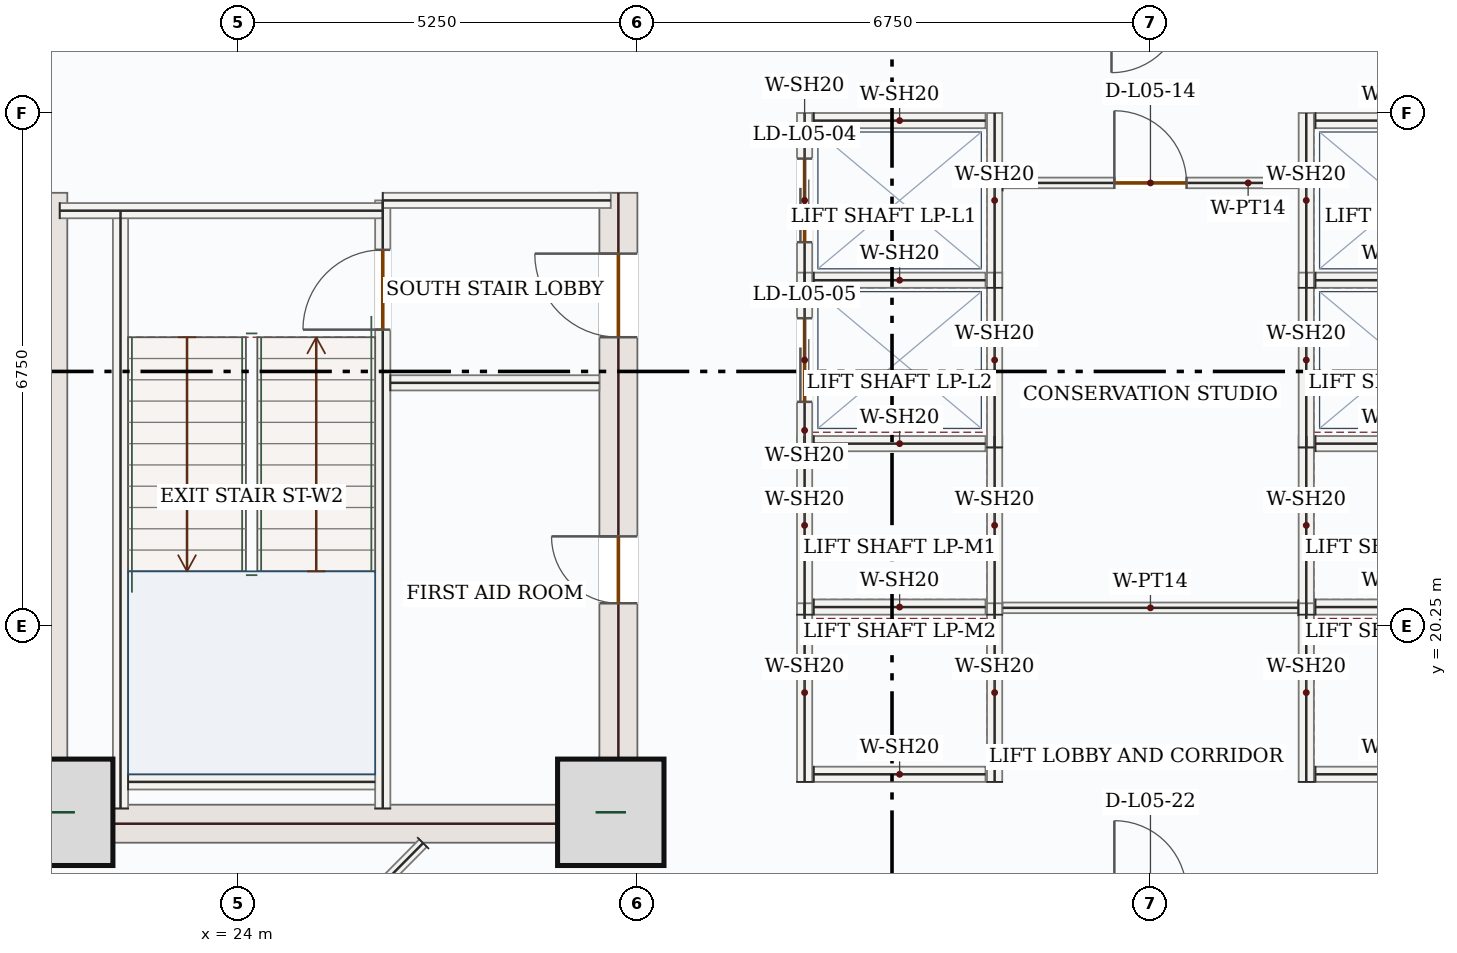
"""IFC4 building model, lengths in metres.
Left out: names, types, materials, properties, quantities, classifications, styles, units other than length and angle.
Written with IfcOpenShell. Run it as: python <this file> out.ifc"""

import sys

from ifc_helpers import new_model, si_unit, direction, frame, frame_2d, origin, origin_2d, place, context, subcontext, project, spatial, rectangle, extrude, source, transform, mapped, element, fill, save


model = new_model("IFC4")
c1 = context("Model", 3, precision=1e-05, world=origin(), true_north=direction((0.0, 1.0)))
c2 = subcontext(c1, "Body", "Model", "MODEL_VIEW")
j1 = project(units=[si_unit("LENGTHUNIT", "METRE"), si_unit("PLANEANGLEUNIT", "RADIAN")], contexts=[c1])
p1 = place(None, origin())
s1 = spatial("IfcSite", under=j1, at=p1, CompositionType="ELEMENT")
p2 = place(p1, origin())
s2 = spatial("IfcBuilding", under=s1, at=p2, CompositionType="ELEMENT")
p3 = place(p2, frame((0.0, 0.0, 29.1)))
s3 = spatial("IfcBuildingStorey", under=s2, at=p3, CompositionType="ELEMENT", Elevation=29.1)
m1 = source(origin(), c2, "Body", "SweptSolid", [
    extrude(rectangle(XDim=8.55, YDim=0.5, at=frame_2d((4.275, 0.0))), origin(), (0.0, 0.0, 1.0), 3.95),
])
p4 = place(p3, frame((21.5, 17.4, 0.0), z_axis=(0.0, 0.0, 1.0), x_axis=(0.0, 1.0, 0.0)))
e1 = element("IfcWall", 1, at=p4, inside=s3, PredefinedType="SHEAR", context=c2, shape_type="MappedRepresentation", body=[
    mapped(m1, transform((0.0, 0.0, 0.0), x_axis=(1.0, 0.0, 0.0), y_axis=(0.0, 1.0, 0.0), z_axis=(0.0, 0.0, 1.0), scale=1.0)),
])
p5 = place(p3, frame((29.0, 17.4, 0.0), z_axis=(0.0, 0.0, 1.0), x_axis=(0.0, 1.0, 0.0)))
e2 = element("IfcWall", 2, at=p5, inside=s3, PredefinedType="SHEAR", context=c2, shape_type="SweptSolid", body=[
    extrude(rectangle(XDim=8.55, YDim=0.5, at=frame_2d((4.275, 0.0))), origin(), (0.0, 0.0, 1.0), 3.95),
])
p6 = place(p5, frame((6.65, 0.0, 0.0)))
e3 = element("IfcOpeningElement", 3, at=p6, cuts=e2, PredefinedType="OPENING", context=c2, shape_type="SweptSolid", body=[
    extrude(rectangle(XDim=1.1, YDim=2.2, at=frame_2d((0.55, 1.1))), frame((0.0, 0.26, 0.0), z_axis=(0.0, -1.0, 0.0), x_axis=(1.0, 0.0, 0.0)), (0.0, 0.0, 1.0), 0.52),
])
p7 = place(p5, frame((3.15, 0.0, 0.0)))
e4 = element("IfcOpeningElement", 4, at=p7, cuts=e2, PredefinedType="OPENING", context=c2, shape_type="SweptSolid", body=[
    extrude(rectangle(XDim=0.88, YDim=2.1, at=frame_2d((0.44, 1.05))), frame((0.0, 0.26, 0.0), z_axis=(0.0, -1.0, 0.0), x_axis=(1.0, 0.0, 0.0)), (0.0, 0.0, 1.0), 0.52),
])
m2 = source(origin(), c2, "Body", "SweptSolid", [
    extrude(rectangle(XDim=7.0, YDim=0.5, at=frame_2d((3.5, 0.0))), origin(), (0.0, 0.0, 1.0), 3.95),
])
p8 = place(p3, frame((21.75, 17.65, 0.0), z_axis=(0.0, 0.0, 1.0), x_axis=(1.0, 0.0, 0.0)))
e5 = element("IfcWall", 5, at=p8, inside=s3, PredefinedType="SHEAR", context=c2, shape_type="MappedRepresentation", body=[
    mapped(m2, transform((0.0, 0.0, 0.0), x_axis=(1.0, 0.0, 0.0), y_axis=(0.0, 1.0, 0.0), z_axis=(0.0, 0.0, 1.0), scale=1.0)),
])
m3 = source(origin(), c2, "Body", "SweptSolid", [
    extrude(rectangle(XDim=1.4, YDim=1.4, at=origin_2d()), origin(), (0.0, 0.0, 1.0), 4.2),
])
for number, where, z_axis, x_axis in (
    (6, (21.65, 17.8, 0.0), (0.0, 0.0, 1.0), (1.0, 0.0, 0.0)),
    (7, (28.9, 17.8, 0.0), (0.0, 0.0, 1.0), (1.0, 0.0, 0.0)),
):
    element("IfcColumn", number, at=place(p3, frame(where, z_axis=z_axis, x_axis=x_axis)), inside=s3, PredefinedType="COLUMN", context=c2, shape_type="MappedRepresentation", body=[
        mapped(m3, transform((0.0, 0.0, 0.0), x_axis=(1.0, 0.0, 0.0), y_axis=(0.0, 1.0, 0.0), z_axis=(0.0, 0.0, 1.0), scale=1.0)),
    ])
p9 = place(p3, frame((22.658, 14.74, 0.0), z_axis=(0.0, 0.0, 1.0), x_axis=(-0.707106781187, 0.707106781187, 0.0)))
e8 = element("IfcWall", 8, at=p9, inside=s3, PredefinedType="SOLIDWALL", context=c2, shape_type="SweptSolid", body=[
    extrude(rectangle(XDim=5.258, YDim=0.32, at=frame_2d((2.629, 0.0))), origin(), (0.0, 0.0, 1.0), 3.95),
])
p10 = place(p9, frame((1.429, 0.0, 0.85)))
e9 = element("IfcOpeningElement", 9, at=p10, cuts=e8, PredefinedType="OPENING", context=c2, shape_type="SweptSolid", body=[
    extrude(rectangle(XDim=2.4, YDim=1.8, at=frame_2d((1.2, 0.9))), frame((0.0, 0.17, 0.0), z_axis=(0.0, -1.0, 0.0), x_axis=(1.0, 0.0, 0.0)), (0.0, 0.0, 1.0), 0.34),
])
m4 = source(origin(), c2, "Body", "SweptSolid", [
    extrude(rectangle(XDim=7.87, YDim=0.2, at=frame_2d((3.935, 0.0))), origin(), (0.0, 0.0, 1.0), 3.95),
])
p11 = place(p3, frame((22.45, 17.85, 0.0), z_axis=(0.0, 0.0, 1.0), x_axis=(0.0, 1.0, 0.0)))
e10 = element("IfcWall", 10, at=p11, inside=s3, PredefinedType="SOLIDWALL", context=c2, shape_type="MappedRepresentation", body=[
    mapped(m4, transform((0.0, 0.0, 0.0), x_axis=(1.0, 0.0, 0.0), y_axis=(0.0, 1.0, 0.0), z_axis=(0.0, 0.0, 1.0), scale=1.0)),
])
p12 = place(p3, frame((25.9, 17.85, 0.0), z_axis=(0.0, 0.0, 1.0), x_axis=(0.0, 1.0, 0.0)))
e11 = element("IfcWall", 11, at=p12, inside=s3, PredefinedType="SOLIDWALL", context=c2, shape_type="SweptSolid", body=[
    extrude(rectangle(XDim=8.0, YDim=0.2, at=frame_2d((4.0, 0.0))), origin(), (0.0, 0.0, 1.0), 3.95),
])
p13 = place(p12, frame((6.3, 0.0, 0.0)))
e12 = element("IfcOpeningElement", 12, at=p13, cuts=e11, PredefinedType="OPENING", context=c2, shape_type="SweptSolid", body=[
    extrude(rectangle(XDim=1.05, YDim=2.15, at=frame_2d((0.525, 1.075))), frame((0.0, 0.11, 0.0), z_axis=(0.0, -1.0, 0.0), x_axis=(1.0, 0.0, 0.0)), (0.0, 0.0, 1.0), 0.22),
])
m5 = source(origin(), c2, "Body", "SweptSolid", [
    extrude(rectangle(XDim=4.25, YDim=0.2, at=frame_2d((2.125, 0.0))), origin(), (0.0, 0.0, 1.0), 3.95),
])
p14 = place(p3, frame((21.65, 25.715, 0.0), z_axis=(0.0, 0.0, 1.0), x_axis=(1.0, 0.0, 0.0)))
e13 = element("IfcWall", 13, at=p14, inside=s3, PredefinedType="SOLIDWALL", context=c2, shape_type="MappedRepresentation", body=[
    mapped(m5, transform((0.0, 0.0, 0.0), x_axis=(1.0, 0.0, 0.0), y_axis=(0.0, 1.0, 0.0), z_axis=(0.0, 0.0, 1.0), scale=1.0)),
])
m6 = source(origin(), c2, "Body", "SweptSolid", [
    extrude(rectangle(XDim=3.0, YDim=0.2, at=frame_2d((1.5, 0.0))), origin(), (0.0, 0.0, 1.0), 3.95),
])
p15 = place(p3, frame((25.9, 25.85, 0.0), z_axis=(0.0, 0.0, 1.0), x_axis=(1.0, 0.0, 0.0)))
e14 = element("IfcWall", 14, at=p15, inside=s3, PredefinedType="SOLIDWALL", context=c2, shape_type="MappedRepresentation", body=[
    mapped(m6, transform((0.0, 0.0, 0.0), x_axis=(1.0, 0.0, 0.0), y_axis=(0.0, 1.0, 0.0), z_axis=(0.0, 0.0, 1.0), scale=1.0)),
])
m7 = source(origin(), c2, "Body", "SweptSolid", [
    extrude(rectangle(XDim=3.25, YDim=0.2, at=frame_2d((1.625, 0.0))), origin(), (0.0, 0.0, 1.0), 3.95),
])
p16 = place(p3, frame((22.55, 18.2, 0.0), z_axis=(0.0, 0.0, 1.0), x_axis=(1.0, 0.0, 0.0)))
e15 = element("IfcWall", 15, at=p16, inside=s3, PredefinedType="SOLIDWALL", context=c2, shape_type="MappedRepresentation", body=[
    mapped(m7, transform((0.0, 0.0, 0.0), x_axis=(1.0, 0.0, 0.0), y_axis=(0.0, 1.0, 0.0), z_axis=(0.0, 0.0, 1.0), scale=1.0)),
])
m8 = source(origin(), c2, "Body", "SweptSolid", [
    extrude(rectangle(XDim=2.75, YDim=0.2, at=frame_2d((1.375, 0.0))), origin(), (0.0, 0.0, 1.0), 3.95),
])
p17 = place(p3, frame((26.0, 23.45, 0.0), z_axis=(0.0, 0.0, 1.0), x_axis=(1.0, 0.0, 0.0)))
e16 = element("IfcWall", 16, at=p17, inside=s3, PredefinedType="SOLIDWALL", context=c2, shape_type="MappedRepresentation", body=[
    mapped(m8, transform((0.0, 0.0, 0.0), x_axis=(1.0, 0.0, 0.0), y_axis=(0.0, 1.0, 0.0), z_axis=(0.0, 0.0, 1.0), scale=1.0)),
])
m9 = source(origin(), c2, "Body", "SweptSolid", [
    extrude(rectangle(XDim=2.35, YDim=0.2, at=frame_2d((1.175, 0.0))), origin(), (0.0, 0.0, 1.0), 3.95),
])
for number, where, z_axis, x_axis in (
    (17, (31.45, 20.4, 0.0), (0.0, 0.0, 1.0), (0.0, 1.0, 0.0)),
    (18, (33.95, 20.4, 0.0), (0.0, 0.0, 1.0), (0.0, 1.0, 0.0)),
):
    element("IfcWall", number, at=place(p3, frame(where, z_axis=z_axis, x_axis=x_axis)), inside=s3, PredefinedType="SOLIDWALL", context=c2, shape_type="MappedRepresentation", body=[
        mapped(m9, transform((0.0, 0.0, 0.0), x_axis=(1.0, 0.0, 0.0), y_axis=(0.0, 1.0, 0.0), z_axis=(0.0, 0.0, 1.0), scale=1.0)),
    ])
m10 = source(origin(), c2, "Body", "SweptSolid", [
    extrude(rectangle(XDim=2.26, YDim=0.2, at=frame_2d((1.13, 0.0))), origin(), (0.0, 0.0, 1.0), 3.95),
])
for number, where, z_axis, x_axis in (
    (19, (31.57, 20.5, 0.0), (0.0, 0.0, 1.0), (1.0, 0.0, 0.0)),
    (20, (31.57, 22.65, 0.0), (0.0, 0.0, 1.0), (1.0, 0.0, 0.0)),
):
    element("IfcWall", number, at=place(p3, frame(where, z_axis=z_axis, x_axis=x_axis)), inside=s3, PredefinedType="SOLIDWALL", context=c2, shape_type="MappedRepresentation", body=[
        mapped(m10, transform((0.0, 0.0, 0.0), x_axis=(1.0, 0.0, 0.0), y_axis=(0.0, 1.0, 0.0), z_axis=(0.0, 0.0, 1.0), scale=1.0)),
    ])
for number, where, z_axis, x_axis in (
    (21, (31.45, 18.2, 0.0), (0.0, 0.0, 1.0), (0.0, 1.0, 0.0)),
    (22, (33.95, 18.2, 0.0), (0.0, 0.0, 1.0), (0.0, 1.0, 0.0)),
):
    element("IfcWall", number, at=place(p3, frame(where, z_axis=z_axis, x_axis=x_axis)), inside=s3, PredefinedType="SOLIDWALL", context=c2, shape_type="MappedRepresentation", body=[
        mapped(m9, transform((0.0, 0.0, 0.0), x_axis=(1.0, 0.0, 0.0), y_axis=(0.0, 1.0, 0.0), z_axis=(0.0, 0.0, 1.0), scale=1.0)),
    ])
p18 = place(p3, frame((31.57, 18.3, 0.0), z_axis=(0.0, 0.0, 1.0), x_axis=(1.0, 0.0, 0.0)))
e23 = element("IfcWall", 23, at=p18, inside=s3, PredefinedType="SOLIDWALL", context=c2, shape_type="MappedRepresentation", body=[
    mapped(m10, transform((0.0, 0.0, 0.0), x_axis=(1.0, 0.0, 0.0), y_axis=(0.0, 1.0, 0.0), z_axis=(0.0, 0.0, 1.0), scale=1.0)),
])
p19 = place(p3, frame((38.05, 20.4, 0.0), z_axis=(0.0, 0.0, 1.0), x_axis=(0.0, 1.0, 0.0)))
e24 = element("IfcWall", 24, at=p19, inside=s3, PredefinedType="SOLIDWALL", context=c2, shape_type="MappedRepresentation", body=[
    mapped(m9, transform((0.0, 0.0, 0.0), x_axis=(1.0, 0.0, 0.0), y_axis=(0.0, 1.0, 0.0), z_axis=(0.0, 0.0, 1.0), scale=1.0)),
])
for number, where, z_axis, x_axis in (
    (25, (38.17, 20.5, 0.0), (0.0, 0.0, 1.0), (1.0, 0.0, 0.0)),
    (26, (38.17, 22.65, 0.0), (0.0, 0.0, 1.0), (1.0, 0.0, 0.0)),
):
    element("IfcWall", number, at=place(p3, frame(where, z_axis=z_axis, x_axis=x_axis)), inside=s3, PredefinedType="SOLIDWALL", context=c2, shape_type="MappedRepresentation", body=[
        mapped(m10, transform((0.0, 0.0, 0.0), x_axis=(1.0, 0.0, 0.0), y_axis=(0.0, 1.0, 0.0), z_axis=(0.0, 0.0, 1.0), scale=1.0)),
    ])
p20 = place(p3, frame((38.05, 18.2, 0.0), z_axis=(0.0, 0.0, 1.0), x_axis=(0.0, 1.0, 0.0)))
e27 = element("IfcWall", 27, at=p20, inside=s3, PredefinedType="SOLIDWALL", context=c2, shape_type="MappedRepresentation", body=[
    mapped(m9, transform((0.0, 0.0, 0.0), x_axis=(1.0, 0.0, 0.0), y_axis=(0.0, 1.0, 0.0), z_axis=(0.0, 0.0, 1.0), scale=1.0)),
])
p21 = place(p3, frame((38.17, 18.3, 0.0), z_axis=(0.0, 0.0, 1.0), x_axis=(1.0, 0.0, 0.0)))
e28 = element("IfcWall", 28, at=p21, inside=s3, PredefinedType="SOLIDWALL", context=c2, shape_type="MappedRepresentation", body=[
    mapped(m10, transform((0.0, 0.0, 0.0), x_axis=(1.0, 0.0, 0.0), y_axis=(0.0, 1.0, 0.0), z_axis=(0.0, 0.0, 1.0), scale=1.0)),
])
p22 = place(p3, frame((31.45, 24.7, 0.0), z_axis=(0.0, 0.0, 1.0), x_axis=(0.0, 1.0, 0.0)))
e29 = element("IfcWall", 29, at=p22, inside=s3, PredefinedType="SOLIDWALL", context=c2, shape_type="SweptSolid", body=[
    extrude(rectangle(XDim=2.3, YDim=0.2, at=frame_2d((1.15, 0.0))), origin(), (0.0, 0.0, 1.0), 3.95),
])
p23 = place(p22, frame((0.6, 0.0, 0.0)))
e30 = element("IfcOpeningElement", 30, at=p23, cuts=e29, PredefinedType="OPENING", context=c2, shape_type="SweptSolid", body=[
    extrude(rectangle(XDim=1.1, YDim=2.15, at=frame_2d((0.55, 1.075))), frame((0.0, 0.11, 0.0), z_axis=(0.0, -1.0, 0.0), x_axis=(1.0, 0.0, 0.0)), (0.0, 0.0, 1.0), 0.22),
])
m11 = source(origin(), c2, "Body", "SweptSolid", [
    extrude(rectangle(XDim=2.3, YDim=0.2, at=frame_2d((1.15, 0.0))), origin(), (0.0, 0.0, 1.0), 3.95),
])
p24 = place(p3, frame((33.95, 24.7, 0.0), z_axis=(0.0, 0.0, 1.0), x_axis=(0.0, 1.0, 0.0)))
e31 = element("IfcWall", 31, at=p24, inside=s3, PredefinedType="SOLIDWALL", context=c2, shape_type="MappedRepresentation", body=[
    mapped(m11, transform((0.0, 0.0, 0.0), x_axis=(1.0, 0.0, 0.0), y_axis=(0.0, 1.0, 0.0), z_axis=(0.0, 0.0, 1.0), scale=1.0)),
])
for number, where, z_axis, x_axis in (
    (32, (31.57, 24.8, 0.0), (0.0, 0.0, 1.0), (1.0, 0.0, 0.0)),
    (33, (31.57, 26.9, 0.0), (0.0, 0.0, 1.0), (1.0, 0.0, 0.0)),
):
    element("IfcWall", number, at=place(p3, frame(where, z_axis=z_axis, x_axis=x_axis)), inside=s3, PredefinedType="SOLIDWALL", context=c2, shape_type="MappedRepresentation", body=[
        mapped(m10, transform((0.0, 0.0, 0.0), x_axis=(1.0, 0.0, 0.0), y_axis=(0.0, 1.0, 0.0), z_axis=(0.0, 0.0, 1.0), scale=1.0)),
    ])
p25 = place(p3, frame((31.45, 22.6, 0.0), z_axis=(0.0, 0.0, 1.0), x_axis=(0.0, 1.0, 0.0)))
e34 = element("IfcWall", 34, at=p25, inside=s3, PredefinedType="SOLIDWALL", context=c2, shape_type="SweptSolid", body=[
    extrude(rectangle(XDim=2.3, YDim=0.2, at=frame_2d((1.15, 0.0))), origin(), (0.0, 0.0, 1.0), 3.95),
])
p26 = place(p25, frame((0.6, 0.0, 0.0)))
e35 = element("IfcOpeningElement", 35, at=p26, cuts=e34, PredefinedType="OPENING", context=c2, shape_type="SweptSolid", body=[
    extrude(rectangle(XDim=1.1, YDim=2.15, at=frame_2d((0.55, 1.075))), frame((0.0, 0.11, 0.0), z_axis=(0.0, -1.0, 0.0), x_axis=(1.0, 0.0, 0.0)), (0.0, 0.0, 1.0), 0.22),
])
m12 = source(origin(), c2, "Body", "SweptSolid", [
    extrude(rectangle(XDim=2.3, YDim=0.2, at=frame_2d((1.15, 0.0))), origin(), (0.0, 0.0, 1.0), 3.95),
])
p27 = place(p3, frame((33.95, 22.6, 0.0), z_axis=(0.0, 0.0, 1.0), x_axis=(0.0, 1.0, 0.0)))
e36 = element("IfcWall", 36, at=p27, inside=s3, PredefinedType="SOLIDWALL", context=c2, shape_type="MappedRepresentation", body=[
    mapped(m12, transform((0.0, 0.0, 0.0), x_axis=(1.0, 0.0, 0.0), y_axis=(0.0, 1.0, 0.0), z_axis=(0.0, 0.0, 1.0), scale=1.0)),
])
p28 = place(p3, frame((38.05, 24.7, 0.0), z_axis=(0.0, 0.0, 1.0), x_axis=(0.0, 1.0, 0.0)))
e37 = element("IfcWall", 37, at=p28, inside=s3, PredefinedType="SOLIDWALL", context=c2, shape_type="MappedRepresentation", body=[
    mapped(m11, transform((0.0, 0.0, 0.0), x_axis=(1.0, 0.0, 0.0), y_axis=(0.0, 1.0, 0.0), z_axis=(0.0, 0.0, 1.0), scale=1.0)),
])
for number, where, z_axis, x_axis in (
    (38, (38.17, 24.8, 0.0), (0.0, 0.0, 1.0), (1.0, 0.0, 0.0)),
    (39, (38.17, 26.9, 0.0), (0.0, 0.0, 1.0), (1.0, 0.0, 0.0)),
):
    element("IfcWall", number, at=place(p3, frame(where, z_axis=z_axis, x_axis=x_axis)), inside=s3, PredefinedType="SOLIDWALL", context=c2, shape_type="MappedRepresentation", body=[
        mapped(m10, transform((0.0, 0.0, 0.0), x_axis=(1.0, 0.0, 0.0), y_axis=(0.0, 1.0, 0.0), z_axis=(0.0, 0.0, 1.0), scale=1.0)),
    ])
p29 = place(p3, frame((38.05, 22.6, 0.0), z_axis=(0.0, 0.0, 1.0), x_axis=(0.0, 1.0, 0.0)))
e40 = element("IfcWall", 40, at=p29, inside=s3, PredefinedType="SOLIDWALL", context=c2, shape_type="MappedRepresentation", body=[
    mapped(m12, transform((0.0, 0.0, 0.0), x_axis=(1.0, 0.0, 0.0), y_axis=(0.0, 1.0, 0.0), z_axis=(0.0, 0.0, 1.0), scale=1.0)),
])
p30 = place(p3, frame((34.055, 26.08, 0.0), z_axis=(0.0, 0.0, 1.0), x_axis=(1.0, 0.0, 0.0)))
e41 = element("IfcWall", 41, at=p30, inside=s3, PredefinedType="PARTITIONING", context=c2, shape_type="SweptSolid", body=[
    extrude(rectangle(XDim=3.89, YDim=0.14, at=frame_2d((1.945, 0.0))), origin(), (0.0, 0.0, 1.0), 3.95),
])
p31 = place(p30, frame((1.47, 0.0, 0.0)))
e42 = element("IfcOpeningElement", 42, at=p31, cuts=e41, PredefinedType="OPENING", context=c2, shape_type="SweptSolid", body=[
    extrude(rectangle(XDim=0.95, YDim=2.15, at=frame_2d((0.475, 1.075))), frame((0.0, 0.08, 0.0), z_axis=(0.0, -1.0, 0.0), x_axis=(1.0, 0.0, 0.0)), (0.0, 0.0, 1.0), 0.16),
])
m13 = source(origin(), c2, "Body", "SweptSolid", [
    extrude(rectangle(XDim=3.89, YDim=0.14, at=frame_2d((1.945, 0.0))), origin(), (0.0, 0.0, 1.0), 3.95),
])
p32 = place(p3, frame((37.945, 20.49, 0.0), z_axis=(0.0, 0.0, 1.0), x_axis=(-1.0, 0.0, 0.0)))
e43 = element("IfcWall", 43, at=p32, inside=s3, PredefinedType="PARTITIONING", context=c2, shape_type="MappedRepresentation", body=[
    mapped(m13, transform((0.0, 0.0, 0.0), x_axis=(1.0, 0.0, 0.0), y_axis=(0.0, 1.0, 0.0), z_axis=(0.0, 0.0, 1.0), scale=1.0)),
])
m14 = source(origin(), c2, "Body", "SweptSolid", [
    extrude(rectangle(XDim=3.505, YDim=0.14, at=frame_2d((1.752, 0.0))), origin(), (0.0, 0.0, 1.0), 3.95),
])
p33 = place(p3, frame((26.431, 17.395, 0.0), z_axis=(0.0, 0.0, 1.0), x_axis=(-0.703790445361, -0.710407635811, 0.0)))
e44 = element("IfcWall", 44, at=p33, inside=s3, PredefinedType="PARTITIONING", context=c2, shape_type="MappedRepresentation", body=[
    mapped(m14, transform((0.0, 0.0, 0.0), x_axis=(1.0, 0.0, 0.0), y_axis=(0.0, 1.0, 0.0), z_axis=(0.0, 0.0, 1.0), scale=1.0)),
])
m15 = source(origin(), c2, "Body", "SweptSolid", [
    extrude(rectangle(XDim=2.4, YDim=1.8, at=frame_2d((1.2, 0.9))), frame((0.0, 0.03, 0.0), z_axis=(0.0, -1.0, 0.0), x_axis=(1.0, 0.0, 0.0)), (0.0, 0.0, 1.0), 0.06),
])
p34 = place(p10, origin())
e45 = element("IfcWindow", 45, at=p34, inside=s3, PartitioningType="DOUBLE_PANEL_VERTICAL", PredefinedType="WINDOW", context=c2, shape_type="MappedRepresentation", body=[
    mapped(m15, transform((0.0, 0.0, 0.0), x_axis=(1.0, 0.0, 0.0), y_axis=(0.0, 1.0, 0.0), z_axis=(0.0, 0.0, 1.0), scale=1.0)),
])
fill(e9, e45)
m16 = source(origin(), c2, "Body", "SweptSolid", [
    extrude(rectangle(XDim=1.05, YDim=2.15, at=frame_2d((0.525, 1.075))), frame((0.0, 0.025, 0.0), z_axis=(0.0, -1.0, 0.0), x_axis=(1.0, 0.0, 0.0)), (0.0, 0.0, 1.0), 0.05),
])
p35 = place(p13, origin())
e46 = element("IfcDoor", 46, at=p35, inside=s3, OperationType="SINGLE_SWING_LEFT", PredefinedType="DOOR", context=c2, shape_type="MappedRepresentation", body=[
    mapped(m16, transform((0.0, 0.0, 0.0), x_axis=(1.0, 0.0, 0.0), y_axis=(0.0, 1.0, 0.0), z_axis=(0.0, 0.0, 1.0), scale=1.0)),
])
fill(e12, e46)
m17 = source(origin(), c2, "Body", "SweptSolid", [
    extrude(rectangle(XDim=1.1, YDim=2.2, at=frame_2d((0.55, 1.1))), frame((0.0, 0.025, 0.0), z_axis=(0.0, -1.0, 0.0), x_axis=(1.0, 0.0, 0.0)), (0.0, 0.0, 1.0), 0.05),
])
p36 = place(p6, origin())
e47 = element("IfcDoor", 47, at=p36, inside=s3, OperationType="SINGLE_SWING_RIGHT", PredefinedType="DOOR", context=c2, shape_type="MappedRepresentation", body=[
    mapped(m17, transform((0.0, 0.0, 0.0), x_axis=(1.0, 0.0, 0.0), y_axis=(0.0, 1.0, 0.0), z_axis=(0.0, 0.0, 1.0), scale=1.0)),
])
fill(e3, e47)
m18 = source(origin(), c2, "Body", "SweptSolid", [
    extrude(rectangle(XDim=0.88, YDim=2.1, at=frame_2d((0.44, 1.05))), frame((0.0, 0.025, 0.0), z_axis=(0.0, -1.0, 0.0), x_axis=(1.0, 0.0, 0.0)), (0.0, 0.0, 1.0), 0.05),
])
p37 = place(p7, origin())
e48 = element("IfcDoor", 48, at=p37, inside=s3, OperationType="SINGLE_SWING_RIGHT", PredefinedType="DOOR", context=c2, shape_type="MappedRepresentation", body=[
    mapped(m18, transform((0.0, 0.0, 0.0), x_axis=(1.0, 0.0, 0.0), y_axis=(0.0, 1.0, 0.0), z_axis=(0.0, 0.0, 1.0), scale=1.0)),
])
fill(e4, e48)
m19 = source(origin(), c2, "Body", "SweptSolid", [
    extrude(rectangle(XDim=1.1, YDim=2.15, at=frame_2d((0.55, 1.075))), frame((0.0, 0.025, 0.0), z_axis=(0.0, -1.0, 0.0), x_axis=(1.0, 0.0, 0.0)), (0.0, 0.0, 1.0), 0.05),
])
p38 = place(p23, origin())
e49 = element("IfcDoor", 49, at=p38, inside=s3, OperationType="DOUBLE_DOOR_SLIDING", PredefinedType="DOOR", context=c2, shape_type="MappedRepresentation", body=[
    mapped(m19, transform((0.0, 0.0, 0.0), x_axis=(1.0, 0.0, 0.0), y_axis=(0.0, 1.0, 0.0), z_axis=(0.0, 0.0, 1.0), scale=1.0)),
])
fill(e30, e49)
p39 = place(p26, origin())
e50 = element("IfcDoor", 50, at=p39, inside=s3, OperationType="DOUBLE_DOOR_SLIDING", PredefinedType="DOOR", context=c2, shape_type="MappedRepresentation", body=[
    mapped(m19, transform((0.0, 0.0, 0.0), x_axis=(1.0, 0.0, 0.0), y_axis=(0.0, 1.0, 0.0), z_axis=(0.0, 0.0, 1.0), scale=1.0)),
])
fill(e35, e50)
m20 = source(origin(), c2, "Body", "SweptSolid", [
    extrude(rectangle(XDim=0.95, YDim=2.15, at=frame_2d((0.475, 1.075))), frame((0.0, 0.025, 0.0), z_axis=(0.0, -1.0, 0.0), x_axis=(1.0, 0.0, 0.0)), (0.0, 0.0, 1.0), 0.05),
])
p40 = place(p31, origin())
e51 = element("IfcDoor", 51, at=p40, inside=s3, OperationType="SINGLE_SWING_LEFT", PredefinedType="DOOR", context=c2, shape_type="MappedRepresentation", body=[
    mapped(m20, transform((0.0, 0.0, 0.0), x_axis=(1.0, 0.0, 0.0), y_axis=(0.0, 1.0, 0.0), z_axis=(0.0, 0.0, 1.0), scale=1.0)),
])
fill(e42, e51)
save(model, sys.argv[1])
